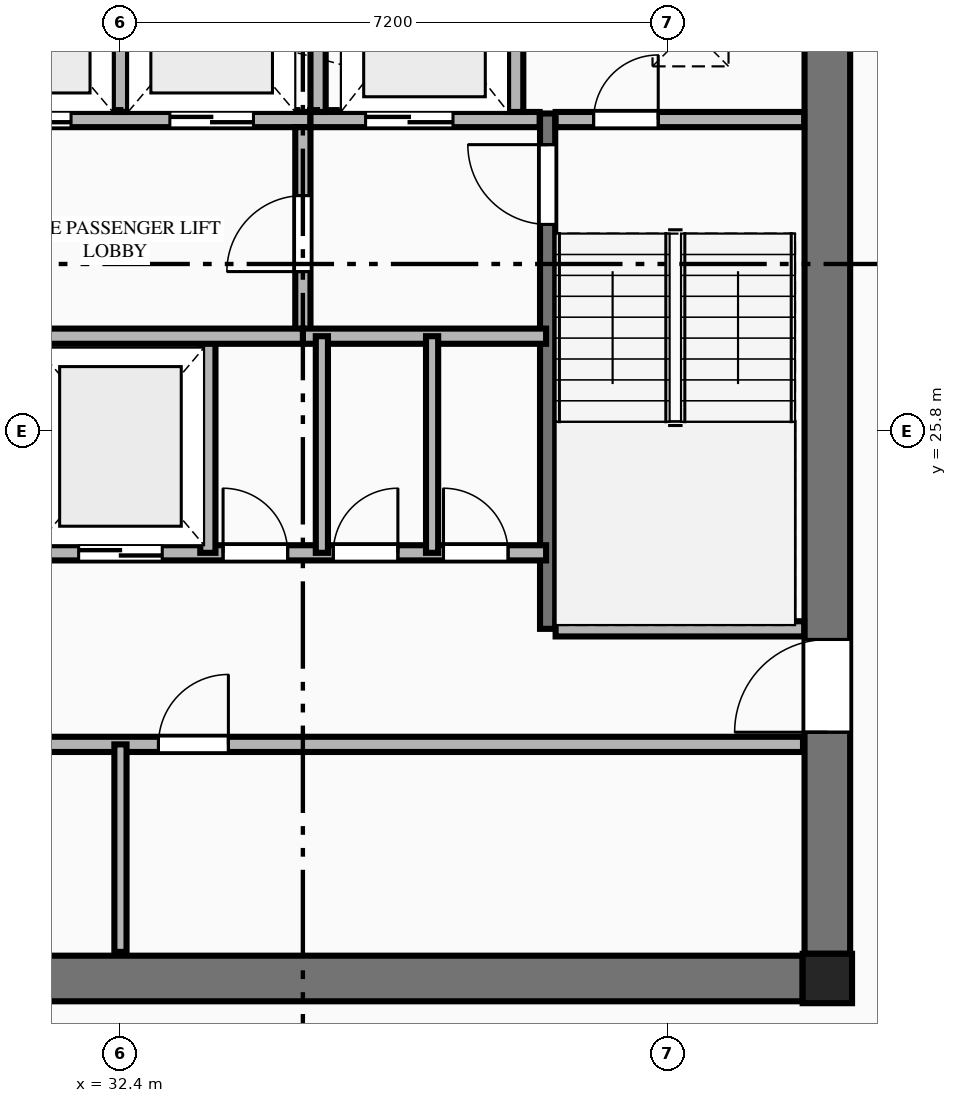
"""IFC4 building model, lengths in metres.
Left out: names, types, materials, properties, quantities, classifications, styles, units other than length and angle.
Written with IfcOpenShell. Run it as: python <this file> out.ifc"""

import sys

from ifc_helpers import new_model, si_unit, direction, frame, frame_2d, origin, origin_2d, place, context, subcontext, project, spatial, rectangle, extrude, element, fill, save


model = new_model("IFC4")
c1 = context("Model", 3, precision=1e-05, world=origin(), true_north=direction((0.0, 1.0)))
c2 = subcontext(c1, "Body", "Model", "MODEL_VIEW")
j1 = project(units=[si_unit("LENGTHUNIT", "METRE"), si_unit("PLANEANGLEUNIT", "RADIAN")], contexts=[c1])
p1 = place(None, origin())
s1 = spatial("IfcSite", under=j1, at=p1, CompositionType="ELEMENT")
p2 = place(p1, origin())
s2 = spatial("IfcBuilding", under=s1, at=p2, CompositionType="ELEMENT")
p3 = place(p2, frame((0.0, 0.0, 179.0)))
s3 = spatial("IfcBuildingStorey", under=s2, at=p3, CompositionType="ELEMENT", Elevation=179.0)
p4 = place(p3, frame((41.7, 18.6, 0.0), z_axis=(0.0, 0.0, 1.0), x_axis=(1.0, 0.0, 0.0)))
e1 = element("IfcColumn", 1, at=p4, inside=s3, PredefinedType="COLUMN", context=c2, shape_type="SweptSolid", body=[
    extrude(rectangle(XDim=0.65, YDim=0.65, at=origin_2d()), origin(), (0.0, 0.0, 1.0), 3.55),
])
p5 = place(p3, frame((23.425, 18.6, 0.0), z_axis=(0.0, 0.0, 1.0), x_axis=(1.0, 0.0, 0.0)))
e2 = element("IfcWall", 2, at=p5, inside=s3, PredefinedType="SHEAR", context=c2, shape_type="SweptSolid", body=[
    extrude(rectangle(XDim=17.95, YDim=0.6, at=frame_2d((8.975, 0.0))), origin(), (0.0, 0.0, 1.0), 3.35),
])
p6 = place(p3, frame((41.7, 18.925, 0.0), z_axis=(0.0, 0.0, 1.0), x_axis=(0.0, 1.0, 0.0)))
e3 = element("IfcWall", 3, at=p6, inside=s3, PredefinedType="SHEAR", context=c2, shape_type="SweptSolid", body=[
    extrude(rectangle(XDim=13.95, YDim=0.6, at=frame_2d((6.975, 0.0))), origin(), (0.0, 0.0, 1.0), 3.35),
])
p7 = place(p6, frame((2.915, 0.0, 0.0)))
e4 = element("IfcOpeningElement", 4, at=p7, cuts=e3, PredefinedType="OPENING", context=c2, shape_type="SweptSolid", body=[
    extrude(rectangle(XDim=1.22, YDim=2.25, at=frame_2d((0.61, 1.125))), frame((0.0, 0.31, 0.0), z_axis=(0.0, -1.0, 0.0), x_axis=(1.0, 0.0, 0.0)), (0.0, 0.0, 1.0), 0.62),
])
p8 = place(p3, frame((38.02, 23.2, 0.0), z_axis=(0.0, 0.0, 1.0), x_axis=(0.0, 1.0, 0.0)))
e5 = element("IfcWall", 5, at=p8, inside=s3, PredefinedType="SHEAR", context=c2, shape_type="SweptSolid", body=[
    extrude(rectangle(XDim=6.78, YDim=0.2, at=frame_2d((3.39, 0.0))), origin(), (0.0, 0.0, 1.0), 3.55),
])
p9 = place(p8, frame((5.32, 0.0, 0.0)))
e6 = element("IfcOpeningElement", 6, at=p9, cuts=e5, PredefinedType="OPENING", context=c2, shape_type="SweptSolid", body=[
    extrude(rectangle(XDim=1.05, YDim=2.15, at=frame_2d((0.525, 1.075))), frame((0.0, 0.11, 0.0), z_axis=(0.0, -1.0, 0.0), x_axis=(1.0, 0.0, 0.0)), (0.0, 0.0, 1.0), 0.22),
])
p10 = place(p3, frame((38.125, 23.2, 0.0), z_axis=(0.0, 0.0, 1.0), x_axis=(1.0, 0.0, 0.0)))
e7 = element("IfcWall", 7, at=p10, inside=s3, PredefinedType="PLUMBINGWALL", context=c2, shape_type="SweptSolid", body=[
    extrude(rectangle(XDim=3.27, YDim=0.2, at=frame_2d((1.635, 0.0))), origin(), (0.0, 0.0, 1.0), 3.35),
])
p11 = place(p3, frame((29.9, 29.9, 0.0), z_axis=(0.0, 0.0, 1.0), x_axis=(1.0, 0.0, 0.0)))
e8 = element("IfcWall", 8, at=p11, inside=s3, PredefinedType="PLUMBINGWALL", context=c2, shape_type="SweptSolid", body=[
    extrude(rectangle(XDim=5.0, YDim=0.2, at=frame_2d((2.5, 0.0))), origin(), (0.0, 0.0, 1.0), 3.35),
])
p12 = place(p11, frame((0.75, 0.0, 0.0)))
e9 = element("IfcOpeningElement", 9, at=p12, cuts=e8, PredefinedType="OPENING", context=c2, shape_type="SweptSolid", body=[
    extrude(rectangle(XDim=1.1, YDim=2.2, at=frame_2d((0.55, 1.1))), frame((0.0, 0.11, 0.0), z_axis=(0.0, -1.0, 0.0), x_axis=(1.0, 0.0, 0.0)), (0.0, 0.0, 1.0), 0.22),
])
p13 = place(p11, frame((3.15, 0.0, 0.0)))
e10 = element("IfcOpeningElement", 10, at=p13, cuts=e8, PredefinedType="OPENING", context=c2, shape_type="SweptSolid", body=[
    extrude(rectangle(XDim=1.1, YDim=2.2, at=frame_2d((0.55, 1.1))), frame((0.0, 0.11, 0.0), z_axis=(0.0, -1.0, 0.0), x_axis=(1.0, 0.0, 0.0)), (0.0, 0.0, 1.0), 0.22),
])
p14 = place(p3, frame((34.9, 29.9, 0.0), z_axis=(0.0, 0.0, 1.0), x_axis=(1.0, 0.0, 0.0)))
e11 = element("IfcWall", 11, at=p14, inside=s3, PredefinedType="PLUMBINGWALL", context=c2, shape_type="SweptSolid", body=[
    extrude(rectangle(XDim=3.015, YDim=0.2, at=frame_2d((1.508, 0.0))), origin(), (0.0, 0.0, 1.0), 3.35),
])
p15 = place(p14, frame((0.725, 0.0, 0.0)))
e12 = element("IfcOpeningElement", 12, at=p15, cuts=e11, PredefinedType="OPENING", context=c2, shape_type="SweptSolid", body=[
    extrude(rectangle(XDim=1.15, YDim=2.2, at=frame_2d((0.575, 1.1))), frame((0.0, 0.11, 0.0), z_axis=(0.0, -1.0, 0.0), x_axis=(1.0, 0.0, 0.0)), (0.0, 0.0, 1.0), 0.22),
])
p16 = place(p3, frame((38.125, 29.9, 0.0), z_axis=(0.0, 0.0, 1.0), x_axis=(1.0, 0.0, 0.0)))
e13 = element("IfcWall", 13, at=p16, inside=s3, PredefinedType="PLUMBINGWALL", context=c2, shape_type="SweptSolid", body=[
    extrude(rectangle(XDim=3.27, YDim=0.2, at=frame_2d((1.635, 0.0))), origin(), (0.0, 0.0, 1.0), 3.35),
])
p17 = place(p16, frame((0.5, 0.0, 0.0)))
e14 = element("IfcOpeningElement", 14, at=p17, cuts=e13, PredefinedType="OPENING", context=c2, shape_type="SweptSolid", body=[
    extrude(rectangle(XDim=0.85, YDim=2.05, at=frame_2d((0.425, 1.025))), frame((0.0, 0.11, 0.0), z_axis=(0.0, -1.0, 0.0), x_axis=(1.0, 0.0, 0.0)), (0.0, 0.0, 1.0), 0.22),
])
for number, where, z_axis, x_axis in (
    (15, (32.4, 30.0, 0.0), (0.0, 0.0, 1.0), (0.0, 1.0, 0.0)),
    (16, (35.0, 30.0, 0.0), (0.0, 0.0, 1.0), (0.0, 1.0, 0.0)),
    (17, (37.6, 30.0, 0.0), (0.0, 0.0, 1.0), (0.0, 1.0, 0.0)),
):
    element("IfcWall", number, at=place(p3, frame(where, z_axis=z_axis, x_axis=x_axis)), inside=s3, PredefinedType="PLUMBINGWALL", context=c2, shape_type="SweptSolid", body=[
        extrude(rectangle(XDim=2.85, YDim=0.2, at=frame_2d((1.425, 0.0))), origin(), (0.0, 0.0, 1.0), 3.35),
    ])
p18 = place(p3, frame((34.8, 27.05, 0.0), z_axis=(0.0, 0.0, 1.0), x_axis=(0.0, 1.0, 0.0)))
e18 = element("IfcWall", 18, at=p18, inside=s3, PredefinedType="PLUMBINGWALL", context=c2, shape_type="SweptSolid", body=[
    extrude(rectangle(XDim=2.75, YDim=0.2, at=frame_2d((1.375, 0.0))), origin(), (0.0, 0.0, 1.0), 3.35),
])
p19 = place(p18, frame((0.85, 0.0, 0.0)))
e19 = element("IfcOpeningElement", 19, at=p19, cuts=e18, PredefinedType="OPENING", context=c2, shape_type="SweptSolid", body=[
    extrude(rectangle(XDim=1.0, YDim=2.15, at=frame_2d((0.5, 1.075))), frame((0.0, 0.11, 0.0), z_axis=(0.0, -1.0, 0.0), x_axis=(1.0, 0.0, 0.0)), (0.0, 0.0, 1.0), 0.22),
])
p20 = place(p3, frame((34.8, 27.05, 0.0), z_axis=(0.0, 0.0, 1.0), x_axis=(1.0, 0.0, 0.0)))
e20 = element("IfcWall", 20, at=p20, inside=s3, PredefinedType="PLUMBINGWALL", context=c2, shape_type="SweptSolid", body=[
    extrude(rectangle(XDim=3.2, YDim=0.2, at=frame_2d((1.6, 0.0))), origin(), (0.0, 0.0, 1.0), 3.35),
])
p21 = place(p3, frame((31.2, 24.2, 0.0), z_axis=(0.0, 0.0, 1.0), x_axis=(1.0, 0.0, 0.0)))
e21 = element("IfcWall", 21, at=p21, inside=s3, PredefinedType="PLUMBINGWALL", context=c2, shape_type="SweptSolid", body=[
    extrude(rectangle(XDim=6.8, YDim=0.2, at=frame_2d((3.4, 0.0))), origin(), (0.0, 0.0, 1.0), 3.35),
])
p22 = place(p21, frame((0.65, 0.0, 0.0)))
e22 = element("IfcOpeningElement", 22, at=p22, cuts=e21, PredefinedType="OPENING", context=c2, shape_type="SweptSolid", body=[
    extrude(rectangle(XDim=1.1, YDim=2.2, at=frame_2d((0.55, 1.1))), frame((0.0, 0.11, 0.0), z_axis=(0.0, -1.0, 0.0), x_axis=(1.0, 0.0, 0.0)), (0.0, 0.0, 1.0), 0.22),
])
p23 = place(p21, frame((2.55, 0.0, 0.0)))
e23 = element("IfcOpeningElement", 23, at=p23, cuts=e21, PredefinedType="OPENING", context=c2, shape_type="SweptSolid", body=[
    extrude(rectangle(XDim=0.85, YDim=2.05, at=frame_2d((0.425, 1.025))), frame((0.0, 0.11, 0.0), z_axis=(0.0, -1.0, 0.0), x_axis=(1.0, 0.0, 0.0)), (0.0, 0.0, 1.0), 0.22),
])
p24 = place(p21, frame((4.0, 0.0, 0.0)))
e24 = element("IfcOpeningElement", 24, at=p24, cuts=e21, PredefinedType="OPENING", context=c2, shape_type="SweptSolid", body=[
    extrude(rectangle(XDim=0.85, YDim=2.05, at=frame_2d((0.425, 1.025))), frame((0.0, 0.11, 0.0), z_axis=(0.0, -1.0, 0.0), x_axis=(1.0, 0.0, 0.0)), (0.0, 0.0, 1.0), 0.22),
])
p25 = place(p21, frame((5.45, 0.0, 0.0)))
e25 = element("IfcOpeningElement", 25, at=p25, cuts=e21, PredefinedType="OPENING", context=c2, shape_type="SweptSolid", body=[
    extrude(rectangle(XDim=0.85, YDim=2.05, at=frame_2d((0.425, 1.025))), frame((0.0, 0.11, 0.0), z_axis=(0.0, -1.0, 0.0), x_axis=(1.0, 0.0, 0.0)), (0.0, 0.0, 1.0), 0.22),
])
p26 = place(p3, frame((33.55, 24.2, 0.0), z_axis=(0.0, 0.0, 1.0), x_axis=(0.0, 1.0, 0.0)))
e26 = element("IfcWall", 26, at=p26, inside=s3, PredefinedType="PLUMBINGWALL", context=c2, shape_type="SweptSolid", body=[
    extrude(rectangle(XDim=2.85, YDim=0.2, at=frame_2d((1.425, 0.0))), origin(), (0.0, 0.0, 1.0), 3.35),
])
p27 = place(p3, frame((31.25, 27.05, 0.0), z_axis=(0.0, 0.0, 1.0), x_axis=(1.0, 0.0, 0.0)))
e27 = element("IfcWall", 27, at=p27, inside=s3, PredefinedType="PLUMBINGWALL", context=c2, shape_type="SweptSolid", body=[
    extrude(rectangle(XDim=3.55, YDim=0.2, at=frame_2d((1.775, 0.0))), origin(), (0.0, 0.0, 1.0), 3.35),
])
for number, where, z_axis, x_axis in (
    (28, (35.05, 24.2, 0.0), (0.0, 0.0, 1.0), (0.0, 1.0, 0.0)),
    (29, (36.5, 24.2, 0.0), (0.0, 0.0, 1.0), (0.0, 1.0, 0.0)),
):
    element("IfcWall", number, at=place(p3, frame(where, z_axis=z_axis, x_axis=x_axis)), inside=s3, PredefinedType="PARTITIONING", context=c2, shape_type="SweptSolid", body=[
        extrude(rectangle(XDim=2.85, YDim=0.16, at=frame_2d((1.425, 0.0))), origin(), (0.0, 0.0, 1.0), 3.35),
    ])
p28 = place(p3, frame((23.42, 21.68, 0.0), z_axis=(0.0, 0.0, 1.0), x_axis=(1.0, 0.0, 0.0)))
e30 = element("IfcWall", 30, at=p28, inside=s3, PredefinedType="PLUMBINGWALL", context=c2, shape_type="SweptSolid", body=[
    extrude(rectangle(XDim=17.96, YDim=0.2, at=frame_2d((8.98, 0.0))), origin(), (0.0, 0.0, 1.0), 3.35),
])
p29 = place(p28, frame((0.46, 0.0, 0.0)))
e31 = element("IfcOpeningElement", 31, at=p29, cuts=e30, PredefinedType="OPENING", context=c2, shape_type="SweptSolid", body=[
    extrude(rectangle(XDim=0.92, YDim=2.15, at=frame_2d((0.46, 1.075))), frame((0.0, 0.11, 0.0), z_axis=(0.0, -1.0, 0.0), x_axis=(1.0, 0.0, 0.0)), (0.0, 0.0, 1.0), 0.22),
])
p30 = place(p28, frame((9.48, 0.0, 0.0)))
e32 = element("IfcOpeningElement", 32, at=p30, cuts=e30, PredefinedType="OPENING", context=c2, shape_type="SweptSolid", body=[
    extrude(rectangle(XDim=0.92, YDim=2.15, at=frame_2d((0.46, 1.075))), frame((0.0, 0.11, 0.0), z_axis=(0.0, -1.0, 0.0), x_axis=(1.0, 0.0, 0.0)), (0.0, 0.0, 1.0), 0.22),
])
p31 = place(p3, frame((32.4, 18.95, 0.0), z_axis=(0.0, 0.0, 1.0), x_axis=(0.0, 1.0, 0.0)))
e33 = element("IfcWall", 33, at=p31, inside=s3, PredefinedType="PARTITIONING", context=c2, shape_type="SweptSolid", body=[
    extrude(rectangle(XDim=2.73, YDim=0.16, at=frame_2d((1.365, 0.0))), origin(), (0.0, 0.0, 1.0), 3.35),
])
p32 = place(p7, origin())
e34 = element("IfcDoor", 34, at=p32, inside=s3, OperationType="SINGLE_SWING_LEFT", PredefinedType="DOOR", context=c2, shape_type="SweptSolid", body=[
    extrude(rectangle(XDim=1.22, YDim=2.25, at=frame_2d((0.61, 1.125))), frame((0.0, 0.025, 0.0), z_axis=(0.0, -1.0, 0.0), x_axis=(1.0, 0.0, 0.0)), (0.0, 0.0, 1.0), 0.05),
])
fill(e4, e34)
p33 = place(p9, origin())
e35 = element("IfcDoor", 35, at=p33, inside=s3, OperationType="SINGLE_SWING_RIGHT", PredefinedType="DOOR", context=c2, shape_type="SweptSolid", body=[
    extrude(rectangle(XDim=1.05, YDim=2.15, at=frame_2d((0.525, 1.075))), frame((0.0, 0.025, 0.0), z_axis=(0.0, -1.0, 0.0), x_axis=(1.0, 0.0, 0.0)), (0.0, 0.0, 1.0), 0.05),
])
fill(e6, e35)
p34 = place(p17, origin())
e36 = element("IfcDoor", 36, at=p34, inside=s3, OperationType="SINGLE_SWING_RIGHT", PredefinedType="DOOR", context=c2, shape_type="SweptSolid", body=[
    extrude(rectangle(XDim=0.85, YDim=2.05, at=frame_2d((0.425, 1.025))), frame((0.0, 0.025, 0.0), z_axis=(0.0, -1.0, 0.0), x_axis=(1.0, 0.0, 0.0)), (0.0, 0.0, 1.0), 0.05),
])
fill(e14, e36)
p35 = place(p15, origin())
e37 = element("IfcDoor", 37, at=p35, inside=s3, OperationType="DOUBLE_DOOR_SLIDING", PredefinedType="DOOR", context=c2, shape_type="SweptSolid", body=[
    extrude(rectangle(XDim=1.15, YDim=2.2, at=frame_2d((0.575, 1.1))), frame((0.0, 0.025, 0.0), z_axis=(0.0, -1.0, 0.0), x_axis=(1.0, 0.0, 0.0)), (0.0, 0.0, 1.0), 0.05),
])
fill(e12, e37)
p36 = place(p12, origin())
e38 = element("IfcDoor", 38, at=p36, inside=s3, OperationType="DOUBLE_DOOR_SLIDING", PredefinedType="DOOR", context=c2, shape_type="SweptSolid", body=[
    extrude(rectangle(XDim=1.1, YDim=2.2, at=frame_2d((0.55, 1.1))), frame((0.0, 0.025, 0.0), z_axis=(0.0, -1.0, 0.0), x_axis=(1.0, 0.0, 0.0)), (0.0, 0.0, 1.0), 0.05),
])
fill(e9, e38)
p37 = place(p13, origin())
e39 = element("IfcDoor", 39, at=p37, inside=s3, OperationType="DOUBLE_DOOR_SLIDING", PredefinedType="DOOR", context=c2, shape_type="SweptSolid", body=[
    extrude(rectangle(XDim=1.1, YDim=2.2, at=frame_2d((0.55, 1.1))), frame((0.0, 0.025, 0.0), z_axis=(0.0, -1.0, 0.0), x_axis=(1.0, 0.0, 0.0)), (0.0, 0.0, 1.0), 0.05),
])
fill(e10, e39)
p38 = place(p19, origin())
e40 = element("IfcDoor", 40, at=p38, inside=s3, OperationType="SINGLE_SWING_LEFT", PredefinedType="DOOR", context=c2, shape_type="SweptSolid", body=[
    extrude(rectangle(XDim=1.0, YDim=2.15, at=frame_2d((0.5, 1.075))), frame((0.0, 0.025, 0.0), z_axis=(0.0, -1.0, 0.0), x_axis=(1.0, 0.0, 0.0)), (0.0, 0.0, 1.0), 0.05),
])
fill(e19, e40)
p39 = place(p22, origin())
e41 = element("IfcDoor", 41, at=p39, inside=s3, OperationType="DOUBLE_DOOR_SLIDING", PredefinedType="DOOR", context=c2, shape_type="SweptSolid", body=[
    extrude(rectangle(XDim=1.1, YDim=2.2, at=frame_2d((0.55, 1.1))), frame((0.0, 0.025, 0.0), z_axis=(0.0, -1.0, 0.0), x_axis=(1.0, 0.0, 0.0)), (0.0, 0.0, 1.0), 0.05),
])
fill(e22, e41)
p40 = place(p23, origin())
e42 = element("IfcDoor", 42, at=p40, inside=s3, OperationType="SINGLE_SWING_LEFT", PredefinedType="DOOR", context=c2, shape_type="SweptSolid", body=[
    extrude(rectangle(XDim=0.85, YDim=2.05, at=frame_2d((0.425, 1.025))), frame((0.0, 0.025, 0.0), z_axis=(0.0, -1.0, 0.0), x_axis=(1.0, 0.0, 0.0)), (0.0, 0.0, 1.0), 0.05),
])
fill(e23, e42)
p41 = place(p24, origin())
e43 = element("IfcDoor", 43, at=p41, inside=s3, OperationType="SINGLE_SWING_RIGHT", PredefinedType="DOOR", context=c2, shape_type="SweptSolid", body=[
    extrude(rectangle(XDim=0.85, YDim=2.05, at=frame_2d((0.425, 1.025))), frame((0.0, 0.025, 0.0), z_axis=(0.0, -1.0, 0.0), x_axis=(1.0, 0.0, 0.0)), (0.0, 0.0, 1.0), 0.05),
])
fill(e24, e43)
p42 = place(p25, origin())
e44 = element("IfcDoor", 44, at=p42, inside=s3, OperationType="SINGLE_SWING_LEFT", PredefinedType="DOOR", context=c2, shape_type="SweptSolid", body=[
    extrude(rectangle(XDim=0.85, YDim=2.05, at=frame_2d((0.425, 1.025))), frame((0.0, 0.025, 0.0), z_axis=(0.0, -1.0, 0.0), x_axis=(1.0, 0.0, 0.0)), (0.0, 0.0, 1.0), 0.05),
])
fill(e25, e44)
p43 = place(p30, origin())
e45 = element("IfcDoor", 45, at=p43, inside=s3, OperationType="SINGLE_SWING_RIGHT", PredefinedType="DOOR", context=c2, shape_type="SweptSolid", body=[
    extrude(rectangle(XDim=0.92, YDim=2.15, at=frame_2d((0.46, 1.075))), frame((0.0, 0.025, 0.0), z_axis=(0.0, -1.0, 0.0), x_axis=(1.0, 0.0, 0.0)), (0.0, 0.0, 1.0), 0.05),
])
fill(e32, e45)
save(model, sys.argv[1])
